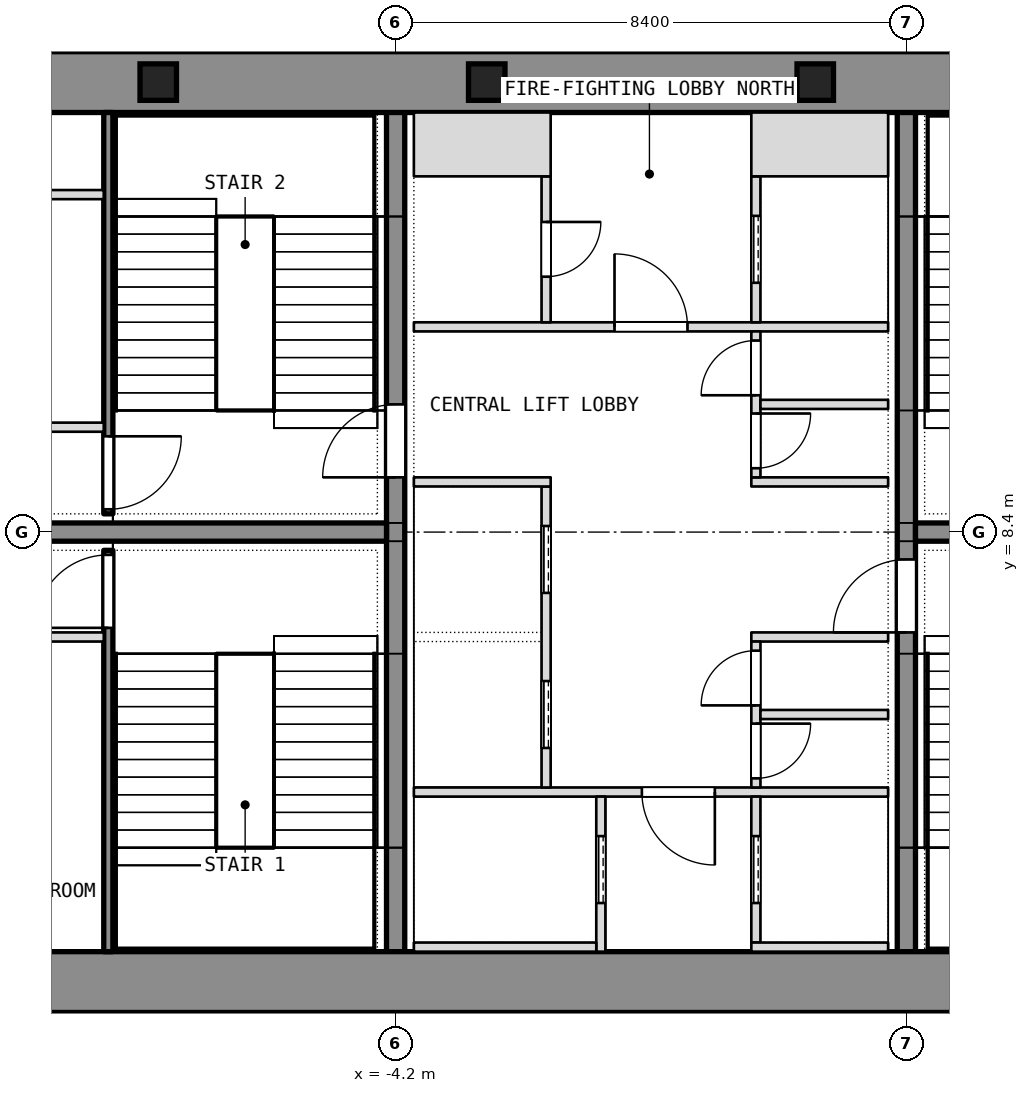
"""IFC4 building model, lengths in metres.
Left out: names, types, materials, properties, quantities, classifications, styles, units other than length and angle.
Written with IfcOpenShell. Run it as: python <this file> out.ifc"""

import sys

from ifc_helpers import new_model, si_unit, direction, frame, frame_2d, origin, origin_2d, place, context, subcontext, project, spatial, rectangle, extrude, element, fill, save


model = new_model("IFC4")
c1 = context("Model", 3, precision=1e-05, world=origin(), true_north=direction((0.0, 1.0)))
c2 = subcontext(c1, "Body", "Model", "MODEL_VIEW")
j1 = project(units=[si_unit("LENGTHUNIT", "METRE"), si_unit("PLANEANGLEUNIT", "RADIAN")], contexts=[c1])
p1 = place(None, origin())
s1 = spatial("IfcSite", under=j1, at=p1, CompositionType="ELEMENT")
p2 = place(p1, origin())
s2 = spatial("IfcBuilding", under=s1, at=p2, CompositionType="ELEMENT")
p3 = place(p2, frame((0.0, 0.0, 288.5)))
s3 = spatial("IfcBuildingStorey", under=s2, at=p3, CompositionType="ELEMENT", Elevation=288.5)
p4 = place(p3, frame((-4.2, 0.5, 0.0), z_axis=(0.0, 0.0, 1.0), x_axis=(0.0, 1.0, 0.0)))
e1 = element("IfcWall", 1, at=p4, inside=s3, PredefinedType="SHEAR", context=c2, shape_type="SweptSolid", body=[
    extrude(rectangle(XDim=15.8, YDim=0.3, at=frame_2d((7.9, 0.0))), origin(), (0.0, 0.0, 1.0), 7.2),
])
p5 = place(p4, frame((8.8, 0.0, 0.0)))
e2 = element("IfcOpeningElement", 2, at=p5, cuts=e1, PredefinedType="OPENING", context=c2, shape_type="SweptSolid", body=[
    extrude(rectangle(XDim=1.2, YDim=2.1, at=frame_2d((0.6, 1.05))), frame((0.0, 0.15, 0.0), z_axis=(0.0, -1.0, 0.0), x_axis=(1.0, 0.0, 0.0)), (0.0, 0.0, 1.0), 0.3),
])
p6 = place(p3, frame((4.2, 0.5, 0.0), z_axis=(0.0, 0.0, 1.0), x_axis=(0.0, 1.0, 0.0)))
e3 = element("IfcWall", 3, at=p6, inside=s3, PredefinedType="SHEAR", context=c2, shape_type="SweptSolid", body=[
    extrude(rectangle(XDim=15.8, YDim=0.3, at=frame_2d((7.9, 0.0))), origin(), (0.0, 0.0, 1.0), 7.2),
])
p7 = place(p6, frame((6.25, 0.0, 0.0)))
e4 = element("IfcOpeningElement", 4, at=p7, cuts=e3, PredefinedType="OPENING", context=c2, shape_type="SweptSolid", body=[
    extrude(rectangle(XDim=1.2, YDim=2.1, at=frame_2d((0.6, 1.05))), frame((0.0, 0.15, 0.0), z_axis=(0.0, -1.0, 0.0), x_axis=(1.0, 0.0, 0.0)), (0.0, 0.0, 1.0), 0.3),
])
for number, where, z_axis, x_axis in (
    (5, (-11.1, 8.4, 0.0), (0.0, 0.0, 1.0), (1.0, 0.0, 0.0)),
    (6, (4.35, 8.4, 0.0), (0.0, 0.0, 1.0), (1.0, 0.0, 0.0)),
):
    element("IfcWall", number, at=place(p3, frame(where, z_axis=z_axis, x_axis=x_axis)), inside=s3, PredefinedType="SHEAR", context=c2, shape_type="SweptSolid", body=[
        extrude(rectangle(XDim=6.75, YDim=0.3, at=frame_2d((3.375, 0.0))), origin(), (0.0, 0.0, 1.0), 7.2),
    ])
for number, where, z_axis, x_axis in (
    (7, (-8.104, 15.8, 0.0), (0.0, 0.0, 1.0), (1.0, 0.0, 0.0)),
    (8, (-2.701, 15.8, 0.0), (0.0, 0.0, 1.0), (1.0, 0.0, 0.0)),
    (9, (2.701, 15.8, 0.0), (0.0, 0.0, 1.0), (1.0, 0.0, 0.0)),
):
    element("IfcColumn", number, at=place(p3, frame(where, z_axis=z_axis, x_axis=x_axis)), inside=s3, PredefinedType="COLUMN", context=c2, shape_type="SweptSolid", body=[
        extrude(rectangle(XDim=0.6, YDim=0.6, at=origin_2d()), origin(), (0.0, 0.0, 1.0), 6.9),
    ])
for number, where, z_axis, x_axis in (
    (10, (-11.1, 1.0, 0.0), (0.0, 0.0, 1.0), (1.0, 0.0, 0.0)),
    (11, (-11.1, 15.8, 0.0), (0.0, 0.0, 1.0), (1.0, 0.0, 0.0)),
):
    element("IfcWall", number, at=place(p3, frame(where, z_axis=z_axis, x_axis=x_axis)), inside=s3, PredefinedType="PARTITIONING", context=c2, shape_type="SweptSolid", body=[
        extrude(rectangle(XDim=22.2, YDim=1.0, at=frame_2d((11.1, 0.0))), origin(), (0.0, 0.0, 1.0), 6.9),
    ])
p8 = place(p3, frame((-8.925, 1.5, 0.0), z_axis=(0.0, 0.0, 1.0), x_axis=(0.0, 1.0, 0.0)))
e12 = element("IfcWall", 12, at=p8, inside=s3, PredefinedType="SHEAR", context=c2, shape_type="SweptSolid", body=[
    extrude(rectangle(XDim=6.6, YDim=0.15, at=frame_2d((3.3, 0.0))), origin(), (0.0, 0.0, 1.0), 6.9),
])
p9 = place(p8, frame((5.325, 0.0, 0.0)))
e13 = element("IfcOpeningElement", 13, at=p9, cuts=e12, PredefinedType="OPENING", context=c2, shape_type="SweptSolid", body=[
    extrude(rectangle(XDim=1.2, YDim=2.1, at=frame_2d((0.6, 1.05))), frame((0.0, 0.075, 0.0), z_axis=(0.0, -1.0, 0.0), x_axis=(1.0, 0.0, 0.0)), (0.0, 0.0, 1.0), 0.15),
])
p10 = place(p3, frame((-11.1, 6.675, 0.0), z_axis=(0.0, 0.0, 1.0), x_axis=(1.0, 0.0, 0.0)))
e14 = element("IfcWall", 14, at=p10, inside=s3, PredefinedType="PARTITIONING", context=c2, shape_type="SweptSolid", body=[
    extrude(rectangle(XDim=2.1, YDim=0.15, at=frame_2d((1.05, 0.0))), origin(), (0.0, 0.0, 1.0), 6.9),
])
p11 = place(p3, frame((-8.925, 8.7, 0.0), z_axis=(0.0, 0.0, 1.0), x_axis=(0.0, 1.0, 0.0)))
e15 = element("IfcWall", 15, at=p11, inside=s3, PredefinedType="SHEAR", context=c2, shape_type="SweptSolid", body=[
    extrude(rectangle(XDim=6.6, YDim=0.15, at=frame_2d((3.3, 0.0))), origin(), (0.0, 0.0, 1.0), 6.9),
])
p12 = place(p11, frame((0.075, 0.0, 0.0)))
e16 = element("IfcOpeningElement", 16, at=p12, cuts=e15, PredefinedType="OPENING", context=c2, shape_type="SweptSolid", body=[
    extrude(rectangle(XDim=1.2, YDim=2.1, at=frame_2d((0.6, 1.05))), frame((0.0, 0.075, 0.0), z_axis=(0.0, -1.0, 0.0), x_axis=(1.0, 0.0, 0.0)), (0.0, 0.0, 1.0), 0.15),
])
for number, where, z_axis, x_axis in (
    (17, (-11.1, 10.125, 0.0), (0.0, 0.0, 1.0), (1.0, 0.0, 0.0)),
    (18, (-11.1, 13.95, 0.0), (0.0, 0.0, 1.0), (1.0, 0.0, 0.0)),
):
    element("IfcWall", number, at=place(p3, frame(where, z_axis=z_axis, x_axis=x_axis)), inside=s3, PredefinedType="PARTITIONING", context=c2, shape_type="SweptSolid", body=[
        extrude(rectangle(XDim=2.1, YDim=0.15, at=frame_2d((1.05, 0.0))), origin(), (0.0, 0.0, 1.0), 6.9),
    ])
p13 = place(p3, frame((-3.9, 4.125, 0.0), z_axis=(0.0, 0.0, 1.0), x_axis=(1.0, 0.0, 0.0)))
e19 = element("IfcWall", 19, at=p13, inside=s3, PredefinedType="PARTITIONING", context=c2, shape_type="SweptSolid", body=[
    extrude(rectangle(XDim=7.8, YDim=0.15, at=frame_2d((3.9, 0.0))), origin(), (0.0, 0.0, 1.0), 6.9),
])
p14 = place(p13, frame((3.75, 0.0, 0.0)))
e20 = element("IfcOpeningElement", 20, at=p14, cuts=e19, PredefinedType="OPENING", context=c2, shape_type="SweptSolid", body=[
    extrude(rectangle(XDim=1.2, YDim=2.1, at=frame_2d((0.6, 1.05))), frame((0.0, 0.075, 0.0), z_axis=(0.0, -1.0, 0.0), x_axis=(1.0, 0.0, 0.0)), (0.0, 0.0, 1.0), 0.15),
])
p15 = place(p3, frame((-3.9, 11.775, 0.0), z_axis=(0.0, 0.0, 1.0), x_axis=(1.0, 0.0, 0.0)))
e21 = element("IfcWall", 21, at=p15, inside=s3, PredefinedType="PARTITIONING", context=c2, shape_type="SweptSolid", body=[
    extrude(rectangle(XDim=7.8, YDim=0.15, at=frame_2d((3.9, 0.0))), origin(), (0.0, 0.0, 1.0), 6.9),
])
p16 = place(p15, frame((3.3, 0.0, 0.0)))
e22 = element("IfcOpeningElement", 22, at=p16, cuts=e21, PredefinedType="OPENING", context=c2, shape_type="SweptSolid", body=[
    extrude(rectangle(XDim=1.2, YDim=2.1, at=frame_2d((0.6, 1.05))), frame((0.0, 0.075, 0.0), z_axis=(0.0, -1.0, 0.0), x_axis=(1.0, 0.0, 0.0)), (0.0, 0.0, 1.0), 0.15),
])
p17 = place(p3, frame((-0.825, 1.5, 0.0), z_axis=(0.0, 0.0, 1.0), x_axis=(0.0, 1.0, 0.0)))
e23 = element("IfcWall", 23, at=p17, inside=s3, PredefinedType="SHEAR", context=c2, shape_type="SweptSolid", body=[
    extrude(rectangle(XDim=2.55, YDim=0.15, at=frame_2d((1.275, 0.0))), origin(), (0.0, 0.0, 1.0), 7.2),
])
p18 = place(p17, frame((0.8, 0.0, 0.0)))
e24 = element("IfcOpeningElement", 24, at=p18, cuts=e23, PredefinedType="OPENING", context=c2, shape_type="SweptSolid", body=[
    extrude(rectangle(XDim=1.1, YDim=2.1, at=frame_2d((0.55, 1.05))), frame((0.0, 0.075, 0.0), z_axis=(0.0, -1.0, 0.0), x_axis=(1.0, 0.0, 0.0)), (0.0, 0.0, 1.0), 0.15),
])
p19 = place(p3, frame((-3.9, 1.575, 0.0), z_axis=(0.0, 0.0, 1.0), x_axis=(1.0, 0.0, 0.0)))
e25 = element("IfcWall", 25, at=p19, inside=s3, PredefinedType="SHEAR", context=c2, shape_type="SweptSolid", body=[
    extrude(rectangle(XDim=3.0, YDim=0.15, at=frame_2d((1.5, 0.0))), origin(), (0.0, 0.0, 1.0), 7.2),
])
p20 = place(p3, frame((-1.725, 4.2, 0.0), z_axis=(0.0, 0.0, 1.0), x_axis=(0.0, 1.0, 0.0)))
e26 = element("IfcWall", 26, at=p20, inside=s3, PredefinedType="SHEAR", context=c2, shape_type="SweptSolid", body=[
    extrude(rectangle(XDim=4.95, YDim=0.15, at=frame_2d((2.475, 0.0))), origin(), (0.0, 0.0, 1.0), 7.2),
])
p21 = place(p20, frame((0.65, 0.0, 0.0)))
e27 = element("IfcOpeningElement", 27, at=p21, cuts=e26, PredefinedType="OPENING", context=c2, shape_type="SweptSolid", body=[
    extrude(rectangle(XDim=1.1, YDim=2.1, at=frame_2d((0.55, 1.05))), frame((0.0, 0.075, 0.0), z_axis=(0.0, -1.0, 0.0), x_axis=(1.0, 0.0, 0.0)), (0.0, 0.0, 1.0), 0.15),
])
p22 = place(p20, frame((3.2, 0.0, 0.0)))
e28 = element("IfcOpeningElement", 28, at=p22, cuts=e26, PredefinedType="OPENING", context=c2, shape_type="SweptSolid", body=[
    extrude(rectangle(XDim=1.1, YDim=2.1, at=frame_2d((0.55, 1.05))), frame((0.0, 0.075, 0.0), z_axis=(0.0, -1.0, 0.0), x_axis=(1.0, 0.0, 0.0)), (0.0, 0.0, 1.0), 0.15),
])
p23 = place(p3, frame((-3.9, 9.225, 0.0), z_axis=(0.0, 0.0, 1.0), x_axis=(1.0, 0.0, 0.0)))
e29 = element("IfcWall", 29, at=p23, inside=s3, PredefinedType="SHEAR", context=c2, shape_type="SweptSolid", body=[
    extrude(rectangle(XDim=2.25, YDim=0.15, at=frame_2d((1.125, 0.0))), origin(), (0.0, 0.0, 1.0), 7.2),
])
p24 = place(p3, frame((-1.725, 11.85, 0.0), z_axis=(0.0, 0.0, 1.0), x_axis=(0.0, 1.0, 0.0)))
e30 = element("IfcWall", 30, at=p24, inside=s3, PredefinedType="PARTITIONING", context=c2, shape_type="SweptSolid", body=[
    extrude(rectangle(XDim=2.4, YDim=0.15, at=frame_2d((1.2, 0.0))), origin(), (0.0, 0.0, 1.0), 6.9),
])
p25 = place(p24, frame((0.75, 0.0, 0.0)))
e31 = element("IfcOpeningElement", 31, at=p25, cuts=e30, PredefinedType="OPENING", context=c2, shape_type="SweptSolid", body=[
    extrude(rectangle(XDim=0.9, YDim=2.1, at=frame_2d((0.45, 1.05))), frame((0.0, 0.075, 0.0), z_axis=(0.0, -1.0, 0.0), x_axis=(1.0, 0.0, 0.0)), (0.0, 0.0, 1.0), 0.15),
])
p26 = place(p3, frame((-3.9, 14.775, 0.0), z_axis=(0.0, 0.0, 1.0), x_axis=(1.0, 0.0, 0.0)))
e32 = element("IfcWall", 32, at=p26, inside=s3, PredefinedType="PARTITIONING", context=c2, shape_type="SweptSolid", body=[
    extrude(rectangle(XDim=2.25, YDim=1.05, at=frame_2d((1.125, 0.0))), origin(), (0.0, 0.0, 1.0), 6.9),
])
p27 = place(p3, frame((1.725, 1.65, 0.0), z_axis=(0.0, 0.0, 1.0), x_axis=(0.0, 1.0, 0.0)))
e33 = element("IfcWall", 33, at=p27, inside=s3, PredefinedType="SHEAR", context=c2, shape_type="SweptSolid", body=[
    extrude(rectangle(XDim=2.4, YDim=0.15, at=frame_2d((1.2, 0.0))), origin(), (0.0, 0.0, 1.0), 7.2),
])
p28 = place(p27, frame((0.65, 0.0, 0.0)))
e34 = element("IfcOpeningElement", 34, at=p28, cuts=e33, PredefinedType="OPENING", context=c2, shape_type="SweptSolid", body=[
    extrude(rectangle(XDim=1.1, YDim=2.1, at=frame_2d((0.55, 1.05))), frame((0.0, 0.075, 0.0), z_axis=(0.0, -1.0, 0.0), x_axis=(1.0, 0.0, 0.0)), (0.0, 0.0, 1.0), 0.15),
])
p29 = place(p3, frame((1.65, 1.575, 0.0), z_axis=(0.0, 0.0, 1.0), x_axis=(1.0, 0.0, 0.0)))
e35 = element("IfcWall", 35, at=p29, inside=s3, PredefinedType="SHEAR", context=c2, shape_type="SweptSolid", body=[
    extrude(rectangle(XDim=2.25, YDim=0.15, at=frame_2d((1.125, 0.0))), origin(), (0.0, 0.0, 1.0), 7.2),
])
p30 = place(p3, frame((1.725, 11.85, 0.0), z_axis=(0.0, 0.0, 1.0), x_axis=(0.0, 1.0, 0.0)))
e36 = element("IfcWall", 36, at=p30, inside=s3, PredefinedType="SHEAR", context=c2, shape_type="SweptSolid", body=[
    extrude(rectangle(XDim=2.4, YDim=0.15, at=frame_2d((1.2, 0.0))), origin(), (0.0, 0.0, 1.0), 7.2),
])
p31 = place(p30, frame((0.65, 0.0, 0.0)))
e37 = element("IfcOpeningElement", 37, at=p31, cuts=e36, PredefinedType="OPENING", context=c2, shape_type="SweptSolid", body=[
    extrude(rectangle(XDim=1.1, YDim=2.1, at=frame_2d((0.55, 1.05))), frame((0.0, 0.075, 0.0), z_axis=(0.0, -1.0, 0.0), x_axis=(1.0, 0.0, 0.0)), (0.0, 0.0, 1.0), 0.15),
])
p32 = place(p3, frame((1.65, 14.775, 0.0), z_axis=(0.0, 0.0, 1.0), x_axis=(1.0, 0.0, 0.0)))
e38 = element("IfcWall", 38, at=p32, inside=s3, PredefinedType="SHEAR", context=c2, shape_type="SweptSolid", body=[
    extrude(rectangle(XDim=2.25, YDim=1.05, at=frame_2d((1.125, 0.0))), origin(), (0.0, 0.0, 1.0), 7.2),
])
for number, where, z_axis, x_axis in (
    (39, (1.65, 6.675, 0.0), (0.0, 0.0, 1.0), (1.0, 0.0, 0.0)),
    (40, (1.65, 9.225, 0.0), (0.0, 0.0, 1.0), (1.0, 0.0, 0.0)),
):
    element("IfcWall", number, at=place(p3, frame(where, z_axis=z_axis, x_axis=x_axis)), inside=s3, PredefinedType="PARTITIONING", context=c2, shape_type="SweptSolid", body=[
        extrude(rectangle(XDim=2.25, YDim=0.15, at=frame_2d((1.125, 0.0))), origin(), (0.0, 0.0, 1.0), 6.9),
    ])
p33 = place(p3, frame((1.725, 4.2, 0.0), z_axis=(0.0, 0.0, 1.0), x_axis=(0.0, 1.0, 0.0)))
e41 = element("IfcWall", 41, at=p33, inside=s3, PredefinedType="PARTITIONING", context=c2, shape_type="SweptSolid", body=[
    extrude(rectangle(XDim=2.4, YDim=0.15, at=frame_2d((1.2, 0.0))), origin(), (0.0, 0.0, 1.0), 6.9),
])
p34 = place(p33, frame((0.15, 0.0, 0.0)))
e42 = element("IfcOpeningElement", 42, at=p34, cuts=e41, PredefinedType="OPENING", context=c2, shape_type="SweptSolid", body=[
    extrude(rectangle(XDim=0.9, YDim=2.1, at=frame_2d((0.45, 1.05))), frame((0.0, 0.075, 0.0), z_axis=(0.0, -1.0, 0.0), x_axis=(1.0, 0.0, 0.0)), (0.0, 0.0, 1.0), 0.15),
])
p35 = place(p33, frame((1.35, 0.0, 0.0)))
e43 = element("IfcOpeningElement", 43, at=p35, cuts=e41, PredefinedType="OPENING", context=c2, shape_type="SweptSolid", body=[
    extrude(rectangle(XDim=0.9, YDim=2.1, at=frame_2d((0.45, 1.05))), frame((0.0, 0.075, 0.0), z_axis=(0.0, -1.0, 0.0), x_axis=(1.0, 0.0, 0.0)), (0.0, 0.0, 1.0), 0.15),
])
p36 = place(p3, frame((1.725, 9.3, 0.0), z_axis=(0.0, 0.0, 1.0), x_axis=(0.0, 1.0, 0.0)))
e44 = element("IfcWall", 44, at=p36, inside=s3, PredefinedType="PARTITIONING", context=c2, shape_type="SweptSolid", body=[
    extrude(rectangle(XDim=2.4, YDim=0.15, at=frame_2d((1.2, 0.0))), origin(), (0.0, 0.0, 1.0), 6.9),
])
p37 = place(p36, frame((0.15, 0.0, 0.0)))
e45 = element("IfcOpeningElement", 45, at=p37, cuts=e44, PredefinedType="OPENING", context=c2, shape_type="SweptSolid", body=[
    extrude(rectangle(XDim=0.9, YDim=2.1, at=frame_2d((0.45, 1.05))), frame((0.0, 0.075, 0.0), z_axis=(0.0, -1.0, 0.0), x_axis=(1.0, 0.0, 0.0)), (0.0, 0.0, 1.0), 0.15),
])
p38 = place(p36, frame((1.35, 0.0, 0.0)))
e46 = element("IfcOpeningElement", 46, at=p38, cuts=e44, PredefinedType="OPENING", context=c2, shape_type="SweptSolid", body=[
    extrude(rectangle(XDim=0.9, YDim=2.1, at=frame_2d((0.45, 1.05))), frame((0.0, 0.075, 0.0), z_axis=(0.0, -1.0, 0.0), x_axis=(1.0, 0.0, 0.0)), (0.0, 0.0, 1.0), 0.15),
])
for number, where, z_axis, x_axis in (
    (47, (1.8, 5.4, 0.0), (0.0, 0.0, 1.0), (1.0, 0.0, 0.0)),
    (48, (1.8, 10.5, 0.0), (0.0, 0.0, 1.0), (1.0, 0.0, 0.0)),
):
    element("IfcWall", number, at=place(p3, frame(where, z_axis=z_axis, x_axis=x_axis)), inside=s3, PredefinedType="PARTITIONING", context=c2, shape_type="SweptSolid", body=[
        extrude(rectangle(XDim=2.1, YDim=0.15, at=frame_2d((1.05, 0.0))), origin(), (0.0, 0.0, 1.0), 6.9),
    ])
p39 = place(p9, origin())
e49 = element("IfcDoor", 49, at=p39, inside=s3, OperationType="SINGLE_SWING_LEFT", PredefinedType="DOOR", context=c2, shape_type="SweptSolid", body=[
    extrude(rectangle(XDim=1.2, YDim=2.1, at=frame_2d((0.6, 1.05))), frame((0.0, 0.025, 0.0), z_axis=(0.0, -1.0, 0.0), x_axis=(1.0, 0.0, 0.0)), (0.0, 0.0, 1.0), 0.05),
])
fill(e13, e49)
p40 = place(p12, origin())
e50 = element("IfcDoor", 50, at=p40, inside=s3, OperationType="SINGLE_SWING_LEFT", PredefinedType="DOOR", context=c2, shape_type="SweptSolid", body=[
    extrude(rectangle(XDim=1.2, YDim=2.1, at=frame_2d((0.6, 1.05))), frame((0.0, 0.025, 0.0), z_axis=(0.0, -1.0, 0.0), x_axis=(1.0, 0.0, 0.0)), (0.0, 0.0, 1.0), 0.05),
])
fill(e16, e50)
p41 = place(p34, origin())
e51 = element("IfcDoor", 51, at=p41, inside=s3, OperationType="SINGLE_SWING_LEFT", PredefinedType="DOOR", context=c2, shape_type="SweptSolid", body=[
    extrude(rectangle(XDim=0.9, YDim=2.1, at=frame_2d((0.45, 1.05))), frame((0.0, 0.025, 0.0), z_axis=(0.0, -1.0, 0.0), x_axis=(1.0, 0.0, 0.0)), (0.0, 0.0, 1.0), 0.05),
])
fill(e42, e51)
p42 = place(p35, origin())
e52 = element("IfcDoor", 52, at=p42, inside=s3, OperationType="SINGLE_SWING_LEFT", PredefinedType="DOOR", context=c2, shape_type="SweptSolid", body=[
    extrude(rectangle(XDim=0.9, YDim=2.1, at=frame_2d((0.45, 1.05))), frame((0.0, 0.025, 0.0), z_axis=(0.0, -1.0, 0.0), x_axis=(1.0, 0.0, 0.0)), (0.0, 0.0, 1.0), 0.05),
])
fill(e43, e52)
p43 = place(p37, origin())
e53 = element("IfcDoor", 53, at=p43, inside=s3, OperationType="SINGLE_SWING_LEFT", PredefinedType="DOOR", context=c2, shape_type="SweptSolid", body=[
    extrude(rectangle(XDim=0.9, YDim=2.1, at=frame_2d((0.45, 1.05))), frame((0.0, 0.025, 0.0), z_axis=(0.0, -1.0, 0.0), x_axis=(1.0, 0.0, 0.0)), (0.0, 0.0, 1.0), 0.05),
])
fill(e45, e53)
p44 = place(p38, origin())
e54 = element("IfcDoor", 54, at=p44, inside=s3, OperationType="SINGLE_SWING_LEFT", PredefinedType="DOOR", context=c2, shape_type="SweptSolid", body=[
    extrude(rectangle(XDim=0.9, YDim=2.1, at=frame_2d((0.45, 1.05))), frame((0.0, 0.025, 0.0), z_axis=(0.0, -1.0, 0.0), x_axis=(1.0, 0.0, 0.0)), (0.0, 0.0, 1.0), 0.05),
])
fill(e46, e54)
p45 = place(p18, origin())
e55 = element("IfcDoor", 55, at=p45, inside=s3, OperationType="SLIDING_TO_LEFT", PredefinedType="DOOR", context=c2, shape_type="SweptSolid", body=[
    extrude(rectangle(XDim=1.1, YDim=2.1, at=frame_2d((0.55, 1.05))), frame((0.0, 0.025, 0.0), z_axis=(0.0, -1.0, 0.0), x_axis=(1.0, 0.0, 0.0)), (0.0, 0.0, 1.0), 0.05),
])
fill(e24, e55)
p46 = place(p21, origin())
e56 = element("IfcDoor", 56, at=p46, inside=s3, OperationType="SLIDING_TO_LEFT", PredefinedType="DOOR", context=c2, shape_type="SweptSolid", body=[
    extrude(rectangle(XDim=1.1, YDim=2.1, at=frame_2d((0.55, 1.05))), frame((0.0, 0.025, 0.0), z_axis=(0.0, -1.0, 0.0), x_axis=(1.0, 0.0, 0.0)), (0.0, 0.0, 1.0), 0.05),
])
fill(e27, e56)
p47 = place(p22, origin())
e57 = element("IfcDoor", 57, at=p47, inside=s3, OperationType="SLIDING_TO_LEFT", PredefinedType="DOOR", context=c2, shape_type="SweptSolid", body=[
    extrude(rectangle(XDim=1.1, YDim=2.1, at=frame_2d((0.55, 1.05))), frame((0.0, 0.025, 0.0), z_axis=(0.0, -1.0, 0.0), x_axis=(1.0, 0.0, 0.0)), (0.0, 0.0, 1.0), 0.05),
])
fill(e28, e57)
p48 = place(p28, origin())
e58 = element("IfcDoor", 58, at=p48, inside=s3, OperationType="SLIDING_TO_LEFT", PredefinedType="DOOR", context=c2, shape_type="SweptSolid", body=[
    extrude(rectangle(XDim=1.1, YDim=2.1, at=frame_2d((0.55, 1.05))), frame((0.0, 0.025, 0.0), z_axis=(0.0, -1.0, 0.0), x_axis=(1.0, 0.0, 0.0)), (0.0, 0.0, 1.0), 0.05),
])
fill(e34, e58)
p49 = place(p31, origin())
e59 = element("IfcDoor", 59, at=p49, inside=s3, OperationType="SLIDING_TO_LEFT", PredefinedType="DOOR", context=c2, shape_type="SweptSolid", body=[
    extrude(rectangle(XDim=1.1, YDim=2.1, at=frame_2d((0.55, 1.05))), frame((0.0, 0.025, 0.0), z_axis=(0.0, -1.0, 0.0), x_axis=(1.0, 0.0, 0.0)), (0.0, 0.0, 1.0), 0.05),
])
fill(e37, e59)
p50 = place(p14, origin())
e60 = element("IfcDoor", 60, at=p50, inside=s3, OperationType="SINGLE_SWING_LEFT", PredefinedType="DOOR", context=c2, shape_type="SweptSolid", body=[
    extrude(rectangle(XDim=1.2, YDim=2.1, at=frame_2d((0.6, 1.05))), frame((0.0, 0.025, 0.0), z_axis=(0.0, -1.0, 0.0), x_axis=(1.0, 0.0, 0.0)), (0.0, 0.0, 1.0), 0.05),
])
fill(e20, e60)
p51 = place(p16, origin())
e61 = element("IfcDoor", 61, at=p51, inside=s3, OperationType="SINGLE_SWING_LEFT", PredefinedType="DOOR", context=c2, shape_type="SweptSolid", body=[
    extrude(rectangle(XDim=1.2, YDim=2.1, at=frame_2d((0.6, 1.05))), frame((0.0, 0.025, 0.0), z_axis=(0.0, -1.0, 0.0), x_axis=(1.0, 0.0, 0.0)), (0.0, 0.0, 1.0), 0.05),
])
fill(e22, e61)
p52 = place(p25, origin())
e62 = element("IfcDoor", 62, at=p52, inside=s3, OperationType="SINGLE_SWING_LEFT", PredefinedType="DOOR", context=c2, shape_type="SweptSolid", body=[
    extrude(rectangle(XDim=0.9, YDim=2.1, at=frame_2d((0.45, 1.05))), frame((0.0, 0.025, 0.0), z_axis=(0.0, -1.0, 0.0), x_axis=(1.0, 0.0, 0.0)), (0.0, 0.0, 1.0), 0.05),
])
fill(e31, e62)
p53 = place(p5, origin())
e63 = element("IfcDoor", 63, at=p53, inside=s3, OperationType="SINGLE_SWING_LEFT", PredefinedType="DOOR", context=c2, shape_type="SweptSolid", body=[
    extrude(rectangle(XDim=1.2, YDim=2.1, at=frame_2d((0.6, 1.05))), frame((0.0, 0.025, 0.0), z_axis=(0.0, -1.0, 0.0), x_axis=(1.0, 0.0, 0.0)), (0.0, 0.0, 1.0), 0.05),
])
fill(e2, e63)
p54 = place(p7, origin())
e64 = element("IfcDoor", 64, at=p54, inside=s3, OperationType="SINGLE_SWING_LEFT", PredefinedType="DOOR", context=c2, shape_type="SweptSolid", body=[
    extrude(rectangle(XDim=1.2, YDim=2.1, at=frame_2d((0.6, 1.05))), frame((0.0, 0.025, 0.0), z_axis=(0.0, -1.0, 0.0), x_axis=(1.0, 0.0, 0.0)), (0.0, 0.0, 1.0), 0.05),
])
fill(e4, e64)
save(model, sys.argv[1])
